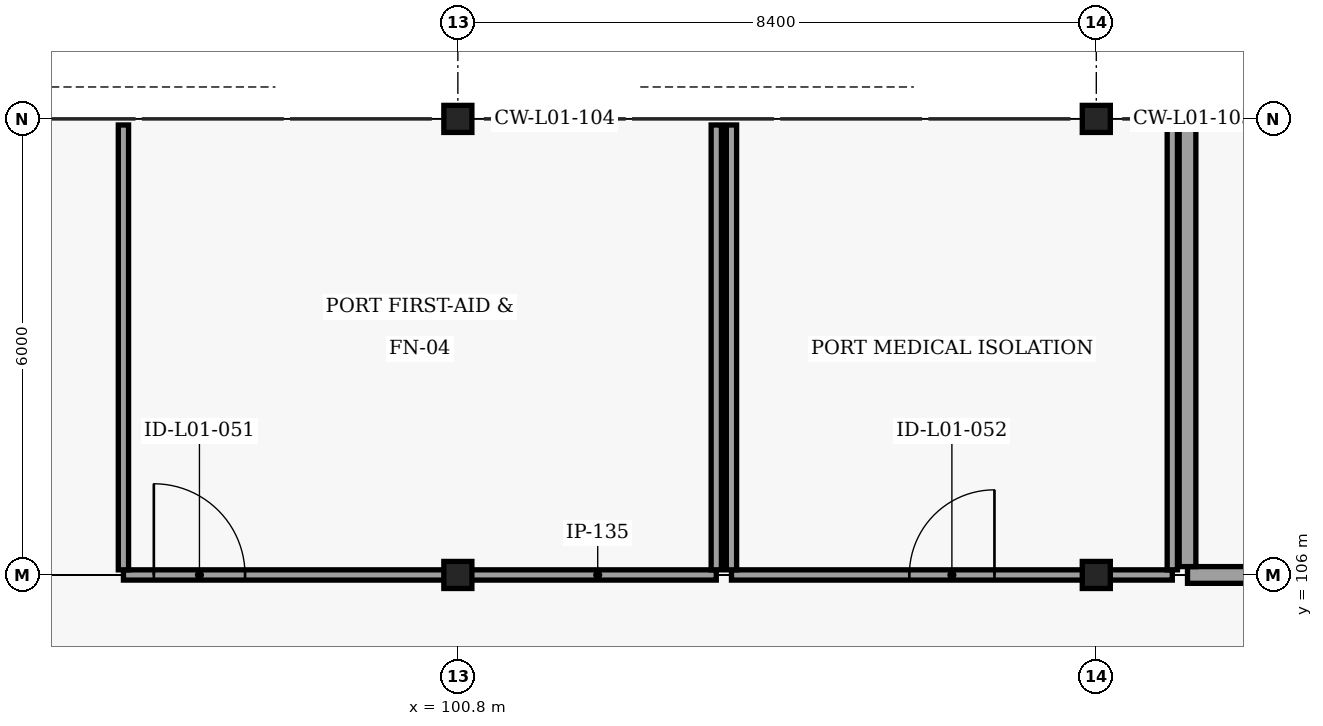
"""IFC4 building model, lengths in metres.
Left out: names, types, materials, properties, quantities, classifications, styles, units other than length and angle.
Written with IfcOpenShell. Run it as: python <this file> out.ifc"""

import sys

from ifc_helpers import new_model, si_unit, direction, frame, frame_2d, origin, origin_2d, place, context, subcontext, project, spatial, rectangle, i_section, extrude, element, fill, save


model = new_model("IFC4")
c1 = context("Model", 3, precision=1e-05, world=origin(), true_north=direction((0.0, 1.0)))
c2 = subcontext(c1, "Body", "Model", "MODEL_VIEW")
j1 = project(units=[si_unit("LENGTHUNIT", "METRE"), si_unit("PLANEANGLEUNIT", "RADIAN")], contexts=[c1])
p1 = place(None, origin())
s1 = spatial("IfcSite", under=j1, at=p1, CompositionType="ELEMENT")
p2 = place(p1, origin())
s2 = spatial("IfcBuilding", under=s1, at=p2, CompositionType="ELEMENT")
p3 = place(p2, origin())
s3 = spatial("IfcBuildingStorey", under=s2, at=p3, CompositionType="ELEMENT", Elevation=0.0)
for number, where, z_axis, x_axis in (
    (1, (100.8, 106.0, -0.45), (0.0, 0.0, 1.0), (1.0, 0.0, 0.0)),
    (2, (109.2, 106.0, -0.45), (0.0, 0.0, 1.0), (1.0, 0.0, 0.0)),
    (3, (100.8, 112.0, -0.45), (0.0, 0.0, 1.0), (1.0, 0.0, 0.0)),
    (4, (109.2, 112.0, -0.45), (0.0, 0.0, 1.0), (1.0, 0.0, 0.0)),
):
    element("IfcColumn", number, at=place(p3, frame(where, z_axis=z_axis, x_axis=x_axis)), inside=s3, PredefinedType="COLUMN", context=c2, shape_type="SweptSolid", body=[
        extrude(i_section(OverallWidth=0.369, OverallDepth=0.356, WebThickness=0.011, FlangeThickness=0.018, FilletRadius=0.015, at=origin_2d()), origin(), (0.0, 0.0, 1.0), 5.57),
    ])
p4 = place(p3, frame((96.4, 106.0, 0.0), z_axis=(0.0, 0.0, 1.0), x_axis=(1.0, 0.0, 0.0)))
e5 = element("IfcWall", 5, at=p4, inside=s3, PredefinedType="PARTITIONING", context=c2, shape_type="SweptSolid", body=[
    extrude(rectangle(XDim=7.8, YDim=0.135, at=frame_2d((3.9, 0.0))), origin(), (0.0, 0.0, 1.0), 4.66),
])
p5 = place(p4, frame((0.4, 0.0, 0.0)))
e6 = element("IfcOpeningElement", 6, at=p5, cuts=e5, PredefinedType="OPENING", context=c2, shape_type="SweptSolid", body=[
    extrude(rectangle(XDim=1.2, YDim=2.2, at=frame_2d((0.6, 1.1))), frame((0.0, 0.077, 0.0), z_axis=(0.0, -1.0, 0.0), x_axis=(1.0, 0.0, 0.0)), (0.0, 0.0, 1.0), 0.155),
])
for number, where, z_axis, x_axis in (
    (7, (96.4, 106.067, 0.0), (0.0, 0.0, 1.0), (0.0, 1.0, 0.0)),
    (8, (104.2, 106.067, 0.0), (0.0, 0.0, 1.0), (0.0, 1.0, 0.0)),
):
    element("IfcWall", number, at=place(p3, frame(where, z_axis=z_axis, x_axis=x_axis)), inside=s3, PredefinedType="PARTITIONING", context=c2, shape_type="SweptSolid", body=[
        extrude(rectangle(XDim=5.853, YDim=0.135, at=frame_2d((2.926, 0.0))), origin(), (0.0, 0.0, 1.0), 4.807),
    ])
p6 = place(p3, frame((104.4, 106.0, 0.0), z_axis=(0.0, 0.0, 1.0), x_axis=(1.0, 0.0, 0.0)))
e9 = element("IfcWall", 9, at=p6, inside=s3, PredefinedType="PARTITIONING", context=c2, shape_type="SweptSolid", body=[
    extrude(rectangle(XDim=5.8, YDim=0.135, at=frame_2d((2.9, 0.0))), origin(), (0.0, 0.0, 1.0), 4.66),
])
p7 = place(p6, frame((2.34, 0.0, 0.0)))
e10 = element("IfcOpeningElement", 10, at=p7, cuts=e9, PredefinedType="OPENING", context=c2, shape_type="SweptSolid", body=[
    extrude(rectangle(XDim=1.12, YDim=2.15, at=frame_2d((0.56, 1.075))), frame((0.0, 0.077, 0.0), z_axis=(0.0, -1.0, 0.0), x_axis=(1.0, 0.0, 0.0)), (0.0, 0.0, 1.0), 0.155),
])
for number, where, z_axis, x_axis in (
    (11, (104.4, 106.067, 0.0), (0.0, 0.0, 1.0), (0.0, 1.0, 0.0)),
    (12, (110.2, 106.067, 0.0), (0.0, 0.0, 1.0), (0.0, 1.0, 0.0)),
):
    element("IfcWall", number, at=place(p3, frame(where, z_axis=z_axis, x_axis=x_axis)), inside=s3, PredefinedType="PARTITIONING", context=c2, shape_type="SweptSolid", body=[
        extrude(rectangle(XDim=5.853, YDim=0.135, at=frame_2d((2.926, 0.0))), origin(), (0.0, 0.0, 1.0), 4.807),
    ])
p8 = place(p3, frame((110.4, 106.0, 0.0), z_axis=(0.0, 0.0, 1.0), x_axis=(1.0, 0.0, 0.0)))
e13 = element("IfcWall", 13, at=p8, inside=s3, PredefinedType="SOLIDWALL", context=c2, shape_type="SweptSolid", body=[
    extrude(rectangle(XDim=7.12, YDim=0.22, at=frame_2d((3.56, 0.0))), origin(), (0.0, 0.0, 1.0), 4.66),
])
p9 = place(p8, frame((3.01, 0.0, 0.0)))
e14 = element("IfcOpeningElement", 14, at=p9, cuts=e13, PredefinedType="OPENING", context=c2, shape_type="SweptSolid", body=[
    extrude(rectangle(XDim=1.1, YDim=2.3, at=frame_2d((0.55, 1.15))), frame((0.0, 0.12, 0.0), z_axis=(0.0, -1.0, 0.0), x_axis=(1.0, 0.0, 0.0)), (0.0, 0.0, 1.0), 0.24),
])
p10 = place(p3, frame((110.4, 106.11, 0.0), z_axis=(0.0, 0.0, 1.0), x_axis=(0.0, 1.0, 0.0)))
e15 = element("IfcWall", 15, at=p10, inside=s3, PredefinedType="SOLIDWALL", context=c2, shape_type="SweptSolid", body=[
    extrude(rectangle(XDim=5.81, YDim=0.22, at=frame_2d((2.905, 0.0))), origin(), (0.0, 0.0, 1.0), 4.807),
])
p11 = place(p5, origin())
e16 = element("IfcDoor", 16, at=p11, inside=s3, OperationType="SINGLE_SWING_LEFT", PredefinedType="DOOR", context=c2, shape_type="SweptSolid", body=[
    extrude(rectangle(XDim=1.2, YDim=2.2, at=frame_2d((0.6, 1.1))), frame((0.0, 0.025, 0.0), z_axis=(0.0, -1.0, 0.0), x_axis=(1.0, 0.0, 0.0)), (0.0, 0.0, 1.0), 0.05),
])
fill(e6, e16)
p12 = place(p7, origin())
e17 = element("IfcDoor", 17, at=p12, inside=s3, OperationType="SINGLE_SWING_RIGHT", PredefinedType="DOOR", context=c2, shape_type="SweptSolid", body=[
    extrude(rectangle(XDim=1.12, YDim=2.15, at=frame_2d((0.56, 1.075))), frame((0.0, 0.025, 0.0), z_axis=(0.0, -1.0, 0.0), x_axis=(1.0, 0.0, 0.0)), (0.0, 0.0, 1.0), 0.05),
])
fill(e10, e17)
save(model, sys.argv[1])
